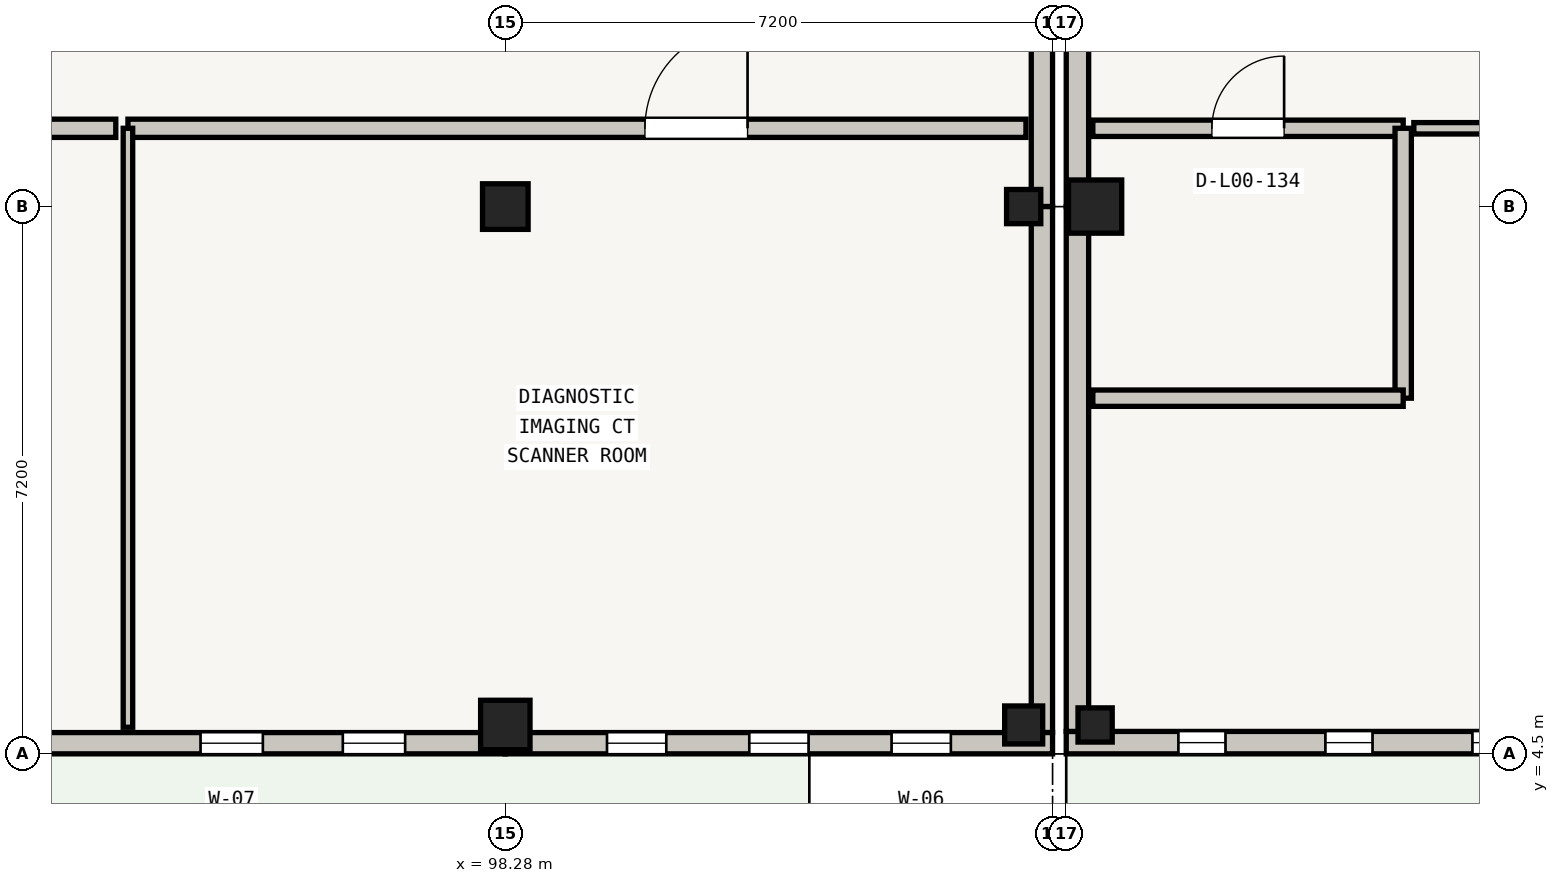
"""IFC4 building model, lengths in metres.
Left out: names, types, materials, properties, quantities, classifications, styles, units other than length and angle.
Written with IfcOpenShell. Run it as: python <this file> out.ifc"""

import sys

from ifc_helpers import new_model, si_unit, direction, frame, frame_2d, origin, origin_2d, place, context, subcontext, project, spatial, rectangle, extrude, element, fill, save


model = new_model("IFC4")
c1 = context("Model", 3, precision=1e-05, world=origin(), true_north=direction((0.0, 1.0)))
c2 = subcontext(c1, "Body", "Model", "MODEL_VIEW")
j1 = project(units=[si_unit("LENGTHUNIT", "METRE"), si_unit("PLANEANGLEUNIT", "RADIAN")], contexts=[c1])
p1 = place(None, origin())
s1 = spatial("IfcSite", under=j1, at=p1, CompositionType="ELEMENT")
p2 = place(p1, origin())
s2 = spatial("IfcBuilding", under=s1, at=p2, CompositionType="ELEMENT")
p3 = place(p2, origin())
s3 = spatial("IfcBuildingStorey", under=s2, at=p3, CompositionType="ELEMENT", Elevation=0.0)
p4 = place(p3, frame((98.28, 4.88, 0.0), z_axis=(0.0, 0.0, 1.0), x_axis=(1.0, 0.0, 0.0)))
e1 = element("IfcColumn", 1, at=p4, inside=s3, PredefinedType="COLUMN", context=c2, shape_type="SweptSolid", body=[
    extrude(rectangle(XDim=0.65, YDim=0.65, at=origin_2d()), origin(), (0.0, 0.0, 1.0), 4.185),
])
p5 = place(p3, frame((98.28, 11.7, 0.0), z_axis=(0.0, 0.0, 1.0), x_axis=(1.0, 0.0, 0.0)))
e2 = element("IfcColumn", 2, at=p5, inside=s3, PredefinedType="COLUMN", context=c2, shape_type="SweptSolid", body=[
    extrude(rectangle(XDim=0.6, YDim=0.6, at=origin_2d()), origin(), (0.0, 0.0, 1.0), 4.185),
])
p6 = place(p3, frame((105.1, 4.88, 0.0), z_axis=(0.0, 0.0, 1.0), x_axis=(1.0, 0.0, 0.0)))
e3 = element("IfcColumn", 3, at=p6, inside=s3, PredefinedType="COLUMN", context=c2, shape_type="SweptSolid", body=[
    extrude(rectangle(XDim=0.5, YDim=0.5, at=origin_2d()), origin(), (0.0, 0.0, 1.0), 4.185),
])
p7 = place(p3, frame((105.1, 11.7, 0.0), z_axis=(0.0, 0.0, 1.0), x_axis=(1.0, 0.0, 0.0)))
e4 = element("IfcColumn", 4, at=p7, inside=s3, PredefinedType="COLUMN", context=c2, shape_type="SweptSolid", body=[
    extrude(rectangle(XDim=0.45, YDim=0.45, at=origin_2d()), origin(), (0.0, 0.0, 1.0), 4.185),
])
p8 = place(p3, frame((106.04, 4.88, 0.0), z_axis=(0.0, 0.0, 1.0), x_axis=(1.0, 0.0, 0.0)))
e5 = element("IfcColumn", 5, at=p8, inside=s3, PredefinedType="COLUMN", context=c2, shape_type="SweptSolid", body=[
    extrude(rectangle(XDim=0.45, YDim=0.45, at=origin_2d()), origin(), (0.0, 0.0, 1.0), 4.205),
])
p9 = place(p3, frame((106.04, 11.7, 0.0), z_axis=(0.0, 0.0, 1.0), x_axis=(1.0, 0.0, 0.0)))
e6 = element("IfcColumn", 6, at=p9, inside=s3, PredefinedType="COLUMN", context=c2, shape_type="SweptSolid", body=[
    extrude(rectangle(XDim=0.7, YDim=0.7, at=origin_2d()), origin(), (0.0, 0.0, 1.0), 4.205),
])
p10 = place(p3, frame((105.34, 18.62, 0.0), z_axis=(0.0, 0.0, 1.0), x_axis=(0.0, -1.0, 0.0)))
e7 = element("IfcWall", 7, at=p10, inside=s3, PredefinedType="STANDARD", context=c2, shape_type="SweptSolid", body=[
    extrude(rectangle(XDim=6.92, YDim=0.28, at=frame_2d((3.46, 0.0))), origin(), (0.0, 0.0, 1.0), 3.62),
])
p11 = place(p3, frame((105.34, 11.7, 0.0), z_axis=(0.0, 0.0, 1.0), x_axis=(0.0, -1.0, 0.0)))
e8 = element("IfcWall", 8, at=p11, inside=s3, PredefinedType="STANDARD", context=c2, shape_type="SweptSolid", body=[
    extrude(rectangle(XDim=6.92, YDim=0.28, at=frame_2d((3.46, 0.0))), origin(), (0.0, 0.0, 1.0), 3.62),
])
p12 = place(p3, frame((105.48, 4.64, 0.0), z_axis=(0.0, 0.0, 1.0), x_axis=(-1.0, 0.0, 0.0)))
e9 = element("IfcWall", 9, at=p12, inside=s3, PredefinedType="STANDARD", context=c2, shape_type="SweptSolid", body=[
    extrude(rectangle(XDim=7.2, YDim=0.28, at=frame_2d((3.6, 0.0))), origin(), (0.0, 0.0, 1.0), 3.57),
])
p13 = place(p12, frame((1.338, 0.0, 0.55)))
e10 = element("IfcOpeningElement", 10, at=p13, cuts=e9, PredefinedType="OPENING", context=c2, shape_type="SweptSolid", body=[
    extrude(rectangle(XDim=0.78, YDim=2.25, at=frame_2d((0.39, 1.125))), frame((0.0, 0.14, 0.0), z_axis=(0.0, -1.0, 0.0), x_axis=(1.0, 0.0, 0.0)), (0.0, 0.0, 1.0), 0.28),
])
p14 = place(p12, frame((3.21, 0.0, 0.55)))
e11 = element("IfcOpeningElement", 11, at=p14, cuts=e9, PredefinedType="OPENING", context=c2, shape_type="SweptSolid", body=[
    extrude(rectangle(XDim=0.78, YDim=2.25, at=frame_2d((0.39, 1.125))), frame((0.0, 0.14, 0.0), z_axis=(0.0, -1.0, 0.0), x_axis=(1.0, 0.0, 0.0)), (0.0, 0.0, 1.0), 0.28),
])
p15 = place(p12, frame((5.082, 0.0, 0.55)))
e12 = element("IfcOpeningElement", 12, at=p15, cuts=e9, PredefinedType="OPENING", context=c2, shape_type="SweptSolid", body=[
    extrude(rectangle(XDim=0.78, YDim=2.25, at=frame_2d((0.39, 1.125))), frame((0.0, 0.14, 0.0), z_axis=(0.0, -1.0, 0.0), x_axis=(1.0, 0.0, 0.0)), (0.0, 0.0, 1.0), 0.28),
])
p16 = place(p3, frame((98.28, 4.64, 0.0), z_axis=(0.0, 0.0, 1.0), x_axis=(-1.0, 0.0, 0.0)))
e13 = element("IfcWall", 13, at=p16, inside=s3, PredefinedType="STANDARD", context=c2, shape_type="SweptSolid", body=[
    extrude(rectangle(XDim=7.2, YDim=0.28, at=frame_2d((3.6, 0.0))), origin(), (0.0, 0.0, 1.0), 3.55),
])
p17 = place(p16, frame((1.318, 0.0, 0.55)))
e14 = element("IfcOpeningElement", 14, at=p17, cuts=e13, PredefinedType="OPENING", context=c2, shape_type="SweptSolid", body=[
    extrude(rectangle(XDim=0.82, YDim=2.2, at=frame_2d((0.41, 1.1))), frame((0.0, 0.14, 0.0), z_axis=(0.0, -1.0, 0.0), x_axis=(1.0, 0.0, 0.0)), (0.0, 0.0, 1.0), 0.28),
])
p18 = place(p16, frame((3.19, 0.0, 0.55)))
e15 = element("IfcOpeningElement", 15, at=p18, cuts=e13, PredefinedType="OPENING", context=c2, shape_type="SweptSolid", body=[
    extrude(rectangle(XDim=0.82, YDim=2.2, at=frame_2d((0.41, 1.1))), frame((0.0, 0.14, 0.0), z_axis=(0.0, -1.0, 0.0), x_axis=(1.0, 0.0, 0.0)), (0.0, 0.0, 1.0), 0.28),
])
p19 = place(p3, frame((113.1, 4.647, 0.0), z_axis=(0.0, 0.0, 1.0), x_axis=(-1.0, 0.0, 0.0)))
e16 = element("IfcWall", 16, at=p19, inside=s3, PredefinedType="STANDARD", context=c2, shape_type="SweptSolid", body=[
    extrude(rectangle(XDim=7.44, YDim=0.295, at=frame_2d((3.72, 0.0))), origin(), (0.0, 0.0, 1.0), 3.24),
])
p20 = place(p19, frame((1.476, 0.0, 0.55)))
e17 = element("IfcOpeningElement", 17, at=p20, cuts=e16, PredefinedType="OPENING", context=c2, shape_type="SweptSolid", body=[
    extrude(rectangle(XDim=0.62, YDim=2.08, at=frame_2d((0.31, 1.04))), frame((0.0, 0.147, 0.0), z_axis=(0.0, -1.0, 0.0), x_axis=(1.0, 0.0, 0.0)), (0.0, 0.0, 1.0), 0.295),
])
p21 = place(p19, frame((3.41, 0.0, 0.55)))
e18 = element("IfcOpeningElement", 18, at=p21, cuts=e16, PredefinedType="OPENING", context=c2, shape_type="SweptSolid", body=[
    extrude(rectangle(XDim=0.62, YDim=2.08, at=frame_2d((0.31, 1.04))), frame((0.0, 0.147, 0.0), z_axis=(0.0, -1.0, 0.0), x_axis=(1.0, 0.0, 0.0)), (0.0, 0.0, 1.0), 0.295),
])
p22 = place(p19, frame((5.344, 0.0, 0.55)))
e19 = element("IfcOpeningElement", 19, at=p22, cuts=e16, PredefinedType="OPENING", context=c2, shape_type="SweptSolid", body=[
    extrude(rectangle(XDim=0.62, YDim=2.08, at=frame_2d((0.31, 1.04))), frame((0.0, 0.147, 0.0), z_axis=(0.0, -1.0, 0.0), x_axis=(1.0, 0.0, 0.0)), (0.0, 0.0, 1.0), 0.295),
])
for number, where, z_axis, x_axis in (
    (20, (105.808, 4.795, 0.0), (0.0, 0.0, 1.0), (0.0, 1.0, 0.0)),
    (21, (105.808, 11.7, 0.0), (0.0, 0.0, 1.0), (0.0, 1.0, 0.0)),
):
    element("IfcWall", number, at=place(p3, frame(where, z_axis=z_axis, x_axis=x_axis)), inside=s3, PredefinedType="STANDARD", context=c2, shape_type="SweptSolid", body=[
        extrude(rectangle(XDim=6.905, YDim=0.295, at=frame_2d((3.453, 0.0))), origin(), (0.0, 0.0, 1.0), 3.57),
    ])
p23 = place(p3, frame((93.315, 12.73, 0.0), z_axis=(0.0, 0.0, 1.0), x_axis=(1.0, 0.0, 0.0)))
e22 = element("IfcWall", 22, at=p23, inside=s3, PredefinedType="SOLIDWALL", context=c2, shape_type="SweptSolid", body=[
    extrude(rectangle(XDim=11.815, YDim=0.24, at=frame_2d((5.907, 0.0))), origin(), (0.0, 0.0, 1.0), 3.205),
])
p24 = place(p23, frame((6.802, 0.0, 0.0)))
e23 = element("IfcOpeningElement", 23, at=p24, cuts=e22, PredefinedType="OPENING", context=c2, shape_type="SweptSolid", body=[
    extrude(rectangle(XDim=1.35, YDim=2.1, at=frame_2d((0.675, 1.05))), frame((0.0, 0.12, 0.0), z_axis=(0.0, -1.0, 0.0), x_axis=(1.0, 0.0, 0.0)), (0.0, 0.0, 1.0), 0.24),
])
p25 = place(p3, frame((93.315, 4.85, 0.0), z_axis=(0.0, 0.0, 1.0), x_axis=(0.0, 1.0, 0.0)))
e24 = element("IfcWall", 24, at=p25, inside=s3, PredefinedType="PARTITIONING", context=c2, shape_type="SweptSolid", body=[
    extrude(rectangle(XDim=7.88, YDim=0.125, at=frame_2d((3.94, 0.0))), origin(), (0.0, 0.0, 1.0), 3.205),
])
p26 = place(p3, frame((81.34, 12.73, 0.0), z_axis=(0.0, 0.0, 1.0), x_axis=(1.0, 0.0, 0.0)))
e25 = element("IfcWall", 25, at=p26, inside=s3, PredefinedType="SOLIDWALL", context=c2, shape_type="SweptSolid", body=[
    extrude(rectangle(XDim=11.815, YDim=0.24, at=frame_2d((5.907, 0.0))), origin(), (0.0, 0.0, 1.0), 3.205),
])
p27 = place(p26, frame((5.232, 0.0, 0.0)))
e26 = element("IfcOpeningElement", 26, at=p27, cuts=e25, PredefinedType="OPENING", context=c2, shape_type="SweptSolid", body=[
    extrude(rectangle(XDim=1.35, YDim=2.1, at=frame_2d((0.675, 1.05))), frame((0.0, 0.12, 0.0), z_axis=(0.0, -1.0, 0.0), x_axis=(1.0, 0.0, 0.0)), (0.0, 0.0, 1.0), 0.24),
])
p28 = place(p3, frame((106.01, 12.73, 0.0), z_axis=(0.0, 0.0, 1.0), x_axis=(1.0, 0.0, 0.0)))
e27 = element("IfcWall", 27, at=p28, inside=s3, PredefinedType="PLUMBINGWALL", context=c2, shape_type="SweptSolid", body=[
    extrude(rectangle(XDim=4.083, YDim=0.215, at=frame_2d((2.042, 0.0))), origin(), (0.0, 0.0, 1.0), 3.225),
])
p29 = place(p28, frame((1.567, 0.0, 0.0)))
e28 = element("IfcOpeningElement", 28, at=p29, cuts=e27, PredefinedType="OPENING", context=c2, shape_type="SweptSolid", body=[
    extrude(rectangle(XDim=0.95, YDim=2.05, at=frame_2d((0.475, 1.025))), frame((0.0, 0.107, 0.0), z_axis=(0.0, -1.0, 0.0), x_axis=(1.0, 0.0, 0.0)), (0.0, 0.0, 1.0), 0.215),
])
p30 = place(p3, frame((110.094, 12.73, 0.0), z_axis=(0.0, 0.0, 1.0), x_axis=(0.0, -1.0, 0.0)))
e29 = element("IfcWall", 29, at=p30, inside=s3, PredefinedType="PLUMBINGWALL", context=c2, shape_type="SweptSolid", body=[
    extrude(rectangle(XDim=3.551, YDim=0.215, at=frame_2d((1.775, 0.0))), origin(), (0.0, 0.0, 1.0), 3.225),
])
p31 = place(p3, frame((110.094, 9.179, 0.0), z_axis=(0.0, 0.0, 1.0), x_axis=(-1.0, 0.0, 0.0)))
e30 = element("IfcWall", 30, at=p31, inside=s3, PredefinedType="PLUMBINGWALL", context=c2, shape_type="SweptSolid", body=[
    extrude(rectangle(XDim=4.083, YDim=0.215, at=frame_2d((2.042, 0.0))), origin(), (0.0, 0.0, 1.0), 3.225),
])
p32 = place(p3, frame((110.233, 12.73, 0.0), z_axis=(0.0, 0.0, 1.0), x_axis=(1.0, 0.0, 0.0)))
e31 = element("IfcWall", 31, at=p32, inside=s3, PredefinedType="PARTITIONING", context=c2, shape_type="SweptSolid", body=[
    extrude(rectangle(XDim=7.527, YDim=0.15, at=frame_2d((3.763, 0.0))), origin(), (0.0, 0.0, 1.0), 3.225),
])
p33 = place(p32, frame((4.242, 0.0, 0.0)))
e32 = element("IfcOpeningElement", 32, at=p33, cuts=e31, PredefinedType="OPENING", context=c2, shape_type="SweptSolid", body=[
    extrude(rectangle(XDim=1.0, YDim=2.05, at=frame_2d((0.5, 1.025))), frame((0.0, 0.075, 0.0), z_axis=(0.0, -1.0, 0.0), x_axis=(1.0, 0.0, 0.0)), (0.0, 0.0, 1.0), 0.15),
])
p34 = place(p13, origin())
e33 = element("IfcWindow", 33, at=p34, inside=s3, PartitioningType="SINGLE_PANEL", PredefinedType="WINDOW", context=c2, shape_type="SweptSolid", body=[
    extrude(rectangle(XDim=0.78, YDim=2.25, at=frame_2d((0.39, 1.125))), frame((0.0, 0.03, 0.0), z_axis=(0.0, -1.0, 0.0), x_axis=(1.0, 0.0, 0.0)), (0.0, 0.0, 1.0), 0.06),
])
fill(e10, e33)
p35 = place(p14, origin())
e34 = element("IfcWindow", 34, at=p35, inside=s3, PartitioningType="SINGLE_PANEL", PredefinedType="WINDOW", context=c2, shape_type="SweptSolid", body=[
    extrude(rectangle(XDim=0.78, YDim=2.25, at=frame_2d((0.39, 1.125))), frame((0.0, 0.03, 0.0), z_axis=(0.0, -1.0, 0.0), x_axis=(1.0, 0.0, 0.0)), (0.0, 0.0, 1.0), 0.06),
])
fill(e11, e34)
p36 = place(p15, origin())
e35 = element("IfcWindow", 35, at=p36, inside=s3, PartitioningType="SINGLE_PANEL", PredefinedType="WINDOW", context=c2, shape_type="SweptSolid", body=[
    extrude(rectangle(XDim=0.78, YDim=2.25, at=frame_2d((0.39, 1.125))), frame((0.0, 0.03, 0.0), z_axis=(0.0, -1.0, 0.0), x_axis=(1.0, 0.0, 0.0)), (0.0, 0.0, 1.0), 0.06),
])
fill(e12, e35)
p37 = place(p17, origin())
e36 = element("IfcWindow", 36, at=p37, inside=s3, PartitioningType="SINGLE_PANEL", PredefinedType="WINDOW", context=c2, shape_type="SweptSolid", body=[
    extrude(rectangle(XDim=0.82, YDim=2.2, at=frame_2d((0.41, 1.1))), frame((0.0, 0.03, 0.0), z_axis=(0.0, -1.0, 0.0), x_axis=(1.0, 0.0, 0.0)), (0.0, 0.0, 1.0), 0.06),
])
fill(e14, e36)
p38 = place(p18, origin())
e37 = element("IfcWindow", 37, at=p38, inside=s3, PartitioningType="SINGLE_PANEL", PredefinedType="WINDOW", context=c2, shape_type="SweptSolid", body=[
    extrude(rectangle(XDim=0.82, YDim=2.2, at=frame_2d((0.41, 1.1))), frame((0.0, 0.03, 0.0), z_axis=(0.0, -1.0, 0.0), x_axis=(1.0, 0.0, 0.0)), (0.0, 0.0, 1.0), 0.06),
])
fill(e15, e37)
p39 = place(p20, origin())
e38 = element("IfcWindow", 38, at=p39, inside=s3, PartitioningType="SINGLE_PANEL", PredefinedType="WINDOW", context=c2, shape_type="SweptSolid", body=[
    extrude(rectangle(XDim=0.62, YDim=2.08, at=frame_2d((0.31, 1.04))), frame((0.0, 0.03, 0.0), z_axis=(0.0, -1.0, 0.0), x_axis=(1.0, 0.0, 0.0)), (0.0, 0.0, 1.0), 0.06),
])
fill(e17, e38)
p40 = place(p21, origin())
e39 = element("IfcWindow", 39, at=p40, inside=s3, PartitioningType="SINGLE_PANEL", PredefinedType="WINDOW", context=c2, shape_type="SweptSolid", body=[
    extrude(rectangle(XDim=0.62, YDim=2.08, at=frame_2d((0.31, 1.04))), frame((0.0, 0.03, 0.0), z_axis=(0.0, -1.0, 0.0), x_axis=(1.0, 0.0, 0.0)), (0.0, 0.0, 1.0), 0.06),
])
fill(e18, e39)
p41 = place(p22, origin())
e40 = element("IfcWindow", 40, at=p41, inside=s3, PartitioningType="SINGLE_PANEL", PredefinedType="WINDOW", context=c2, shape_type="SweptSolid", body=[
    extrude(rectangle(XDim=0.62, YDim=2.08, at=frame_2d((0.31, 1.04))), frame((0.0, 0.03, 0.0), z_axis=(0.0, -1.0, 0.0), x_axis=(1.0, 0.0, 0.0)), (0.0, 0.0, 1.0), 0.06),
])
fill(e19, e40)
p42 = place(p24, origin())
e41 = element("IfcDoor", 41, at=p42, inside=s3, OperationType="SINGLE_SWING_RIGHT", PredefinedType="DOOR", context=c2, shape_type="SweptSolid", body=[
    extrude(rectangle(XDim=1.35, YDim=2.1, at=frame_2d((0.675, 1.05))), frame((0.0, 0.025, 0.0), z_axis=(0.0, -1.0, 0.0), x_axis=(1.0, 0.0, 0.0)), (0.0, 0.0, 1.0), 0.05),
])
fill(e23, e41)
p43 = place(p29, origin())
e42 = element("IfcDoor", 42, at=p43, inside=s3, OperationType="SINGLE_SWING_RIGHT", PredefinedType="DOOR", context=c2, shape_type="SweptSolid", body=[
    extrude(rectangle(XDim=0.95, YDim=2.05, at=frame_2d((0.475, 1.025))), frame((0.0, 0.025, 0.0), z_axis=(0.0, -1.0, 0.0), x_axis=(1.0, 0.0, 0.0)), (0.0, 0.0, 1.0), 0.05),
])
fill(e28, e42)
save(model, sys.argv[1])
